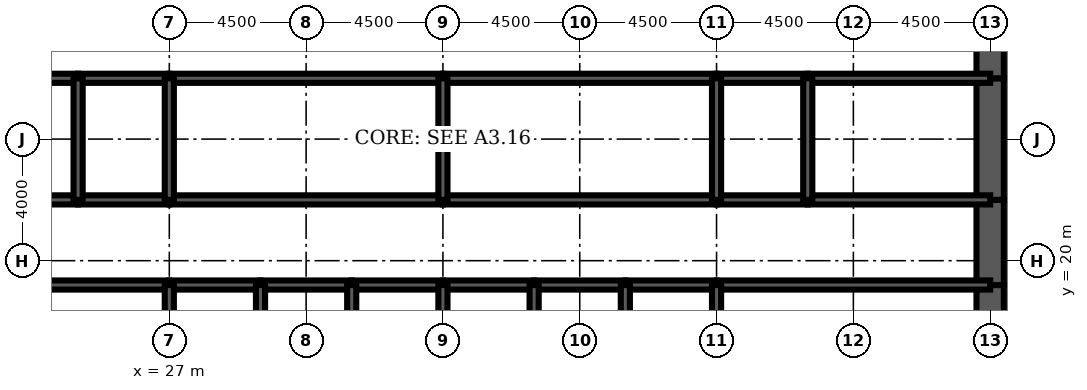
"""IFC4 building model, lengths in metres.
Left out: names, types, materials, properties, quantities, classifications, styles, units other than length and angle.
Written with IfcOpenShell. Run it as: python <this file> out.ifc"""

import sys

from ifc_helpers import new_model, si_unit, direction, frame, frame_2d, origin, place, context, subcontext, project, spatial, rectangle, extrude, element, fill, save


model = new_model("IFC4")
c1 = context("Model", 3, precision=1e-05, world=origin(), true_north=direction((0.0, 1.0)))
c2 = subcontext(c1, "Body", "Model", "MODEL_VIEW")
j1 = project(units=[si_unit("LENGTHUNIT", "METRE"), si_unit("PLANEANGLEUNIT", "RADIAN")], contexts=[c1])
p1 = place(None, origin())
s1 = spatial("IfcSite", under=j1, at=p1, CompositionType="ELEMENT")
p2 = place(p1, origin())
s2 = spatial("IfcBuilding", under=s1, at=p2, CompositionType="ELEMENT")
p3 = place(p2, frame((0.0, 0.0, 68.0)))
s3 = spatial("IfcBuildingStorey", under=s2, at=p3, CompositionType="ELEMENT", Elevation=68.0)
p4 = place(p3, frame((54.0, 16.0, 0.0), z_axis=(0.0, 0.0, 1.0), x_axis=(0.0, 1.0, 0.0)))
e1 = element("IfcWall", 1, at=p4, inside=s3, PredefinedType="SHEAR", context=c2, shape_type="SweptSolid", body=[
    extrude(rectangle(XDim=3.2, YDim=0.9, at=frame_2d((1.6, 0.0))), origin(), (0.0, 0.0, 1.0), 4.5),
])
p5 = place(p3, frame((54.0, 19.2, 0.0), z_axis=(0.0, 0.0, 1.0), x_axis=(0.0, 1.0, 0.0)))
e2 = element("IfcWall", 2, at=p5, inside=s3, PredefinedType="SHEAR", context=c2, shape_type="SweptSolid", body=[
    extrude(rectangle(XDim=2.8, YDim=0.9, at=frame_2d((1.4, 0.0))), origin(), (0.0, 0.0, 1.0), 4.5),
])
p6 = place(p5, frame((0.4, 0.0, 0.0)))
e3 = element("IfcOpeningElement", 3, at=p6, cuts=e2, PredefinedType="OPENING", context=c2, shape_type="SweptSolid", body=[
    extrude(rectangle(XDim=1.8, YDim=2.1, at=frame_2d((0.9, 1.05))), frame((0.0, 0.46, 0.0), z_axis=(0.0, -1.0, 0.0), x_axis=(1.0, 0.0, 0.0)), (0.0, 0.0, 1.0), 0.92),
])
p7 = place(p3, frame((54.0, 22.0, 0.0), z_axis=(0.0, 0.0, 1.0), x_axis=(0.0, 1.0, 0.0)))
e4 = element("IfcWall", 4, at=p7, inside=s3, PredefinedType="SHEAR", context=c2, shape_type="SweptSolid", body=[
    extrude(rectangle(XDim=4.0, YDim=0.9, at=frame_2d((2.0, 0.0))), origin(), (0.0, 0.0, 1.0), 4.5),
])
p8 = place(p3, frame((54.0, 26.0, 0.0), z_axis=(0.0, 0.0, 1.0), x_axis=(0.0, 1.0, 0.0)))
e5 = element("IfcWall", 5, at=p8, inside=s3, PredefinedType="SHEAR", context=c2, shape_type="SweptSolid", body=[
    extrude(rectangle(XDim=2.8, YDim=0.9, at=frame_2d((1.4, 0.0))), origin(), (0.0, 0.0, 1.0), 4.5),
])
p9 = place(p8, frame((0.6, 0.0, 0.0)))
e6 = element("IfcOpeningElement", 6, at=p9, cuts=e5, PredefinedType="OPENING", context=c2, shape_type="SweptSolid", body=[
    extrude(rectangle(XDim=1.8, YDim=2.1, at=frame_2d((0.9, 1.05))), frame((0.0, 0.46, 0.0), z_axis=(0.0, -1.0, 0.0), x_axis=(1.0, 0.0, 0.0)), (0.0, 0.0, 1.0), 0.92),
])
p10 = place(p3, frame((18.0, 19.2, 0.0), z_axis=(0.0, 0.0, 1.0), x_axis=(1.0, 0.0, 0.0)))
e7 = element("IfcWall", 7, at=p10, inside=s3, PredefinedType="SOLIDWALL", context=c2, shape_type="SweptSolid", body=[
    extrude(rectangle(XDim=9.0, YDim=0.3, at=frame_2d((4.5, 0.0))), origin(), (0.0, 0.0, 1.0), 4.5),
])
p11 = place(p10, frame((0.65, 0.0, 0.0)))
e8 = element("IfcOpeningElement", 8, at=p11, cuts=e7, PredefinedType="OPENING", context=c2, shape_type="SweptSolid", body=[
    extrude(rectangle(XDim=1.0, YDim=2.1, at=frame_2d((0.5, 1.05))), frame((0.0, 0.16, 0.0), z_axis=(0.0, -1.0, 0.0), x_axis=(1.0, 0.0, 0.0)), (0.0, 0.0, 1.0), 0.32),
])
p12 = place(p3, frame((27.0, 19.2, 0.0), z_axis=(0.0, 0.0, 1.0), x_axis=(1.0, 0.0, 0.0)))
e9 = element("IfcWall", 9, at=p12, inside=s3, PredefinedType="SOLIDWALL", context=c2, shape_type="SweptSolid", body=[
    extrude(rectangle(XDim=3.0, YDim=0.3, at=frame_2d((1.5, 0.0))), origin(), (0.0, 0.0, 1.0), 4.5),
])
p13 = place(p12, frame((0.95, 0.0, 0.0)))
e10 = element("IfcOpeningElement", 10, at=p13, cuts=e9, PredefinedType="OPENING", context=c2, shape_type="SweptSolid", body=[
    extrude(rectangle(XDim=1.1, YDim=2.2, at=frame_2d((0.55, 1.1))), frame((0.0, 0.16, 0.0), z_axis=(0.0, -1.0, 0.0), x_axis=(1.0, 0.0, 0.0)), (0.0, 0.0, 1.0), 0.32),
])
p14 = place(p3, frame((30.0, 19.2, 0.0), z_axis=(0.0, 0.0, 1.0), x_axis=(1.0, 0.0, 0.0)))
e11 = element("IfcWall", 11, at=p14, inside=s3, PredefinedType="SOLIDWALL", context=c2, shape_type="SweptSolid", body=[
    extrude(rectangle(XDim=3.0, YDim=0.3, at=frame_2d((1.5, 0.0))), origin(), (0.0, 0.0, 1.0), 4.5),
])
p15 = place(p14, frame((0.95, 0.0, 0.0)))
e12 = element("IfcOpeningElement", 12, at=p15, cuts=e11, PredefinedType="OPENING", context=c2, shape_type="SweptSolid", body=[
    extrude(rectangle(XDim=1.1, YDim=2.2, at=frame_2d((0.55, 1.1))), frame((0.0, 0.16, 0.0), z_axis=(0.0, -1.0, 0.0), x_axis=(1.0, 0.0, 0.0)), (0.0, 0.0, 1.0), 0.32),
])
p16 = place(p3, frame((33.0, 19.2, 0.0), z_axis=(0.0, 0.0, 1.0), x_axis=(1.0, 0.0, 0.0)))
e13 = element("IfcWall", 13, at=p16, inside=s3, PredefinedType="SOLIDWALL", context=c2, shape_type="SweptSolid", body=[
    extrude(rectangle(XDim=3.0, YDim=0.3, at=frame_2d((1.5, 0.0))), origin(), (0.0, 0.0, 1.0), 4.5),
])
p17 = place(p16, frame((0.95, 0.0, 0.0)))
e14 = element("IfcOpeningElement", 14, at=p17, cuts=e13, PredefinedType="OPENING", context=c2, shape_type="SweptSolid", body=[
    extrude(rectangle(XDim=1.1, YDim=2.2, at=frame_2d((0.55, 1.1))), frame((0.0, 0.16, 0.0), z_axis=(0.0, -1.0, 0.0), x_axis=(1.0, 0.0, 0.0)), (0.0, 0.0, 1.0), 0.32),
])
p18 = place(p3, frame((36.0, 19.2, 0.0), z_axis=(0.0, 0.0, 1.0), x_axis=(1.0, 0.0, 0.0)))
e15 = element("IfcWall", 15, at=p18, inside=s3, PredefinedType="SOLIDWALL", context=c2, shape_type="SweptSolid", body=[
    extrude(rectangle(XDim=3.0, YDim=0.3, at=frame_2d((1.5, 0.0))), origin(), (0.0, 0.0, 1.0), 4.5),
])
p19 = place(p18, frame((0.95, 0.0, 0.0)))
e16 = element("IfcOpeningElement", 16, at=p19, cuts=e15, PredefinedType="OPENING", context=c2, shape_type="SweptSolid", body=[
    extrude(rectangle(XDim=1.1, YDim=2.2, at=frame_2d((0.55, 1.1))), frame((0.0, 0.16, 0.0), z_axis=(0.0, -1.0, 0.0), x_axis=(1.0, 0.0, 0.0)), (0.0, 0.0, 1.0), 0.32),
])
for number, where, z_axis, x_axis in (
    (17, (39.0, 19.2, 0.0), (0.0, 0.0, 1.0), (1.0, 0.0, 0.0)),
    (18, (42.0, 19.2, 0.0), (0.0, 0.0, 1.0), (1.0, 0.0, 0.0)),
):
    element("IfcWall", number, at=place(p3, frame(where, z_axis=z_axis, x_axis=x_axis)), inside=s3, PredefinedType="SOLIDWALL", context=c2, shape_type="SweptSolid", body=[
        extrude(rectangle(XDim=3.0, YDim=0.3, at=frame_2d((1.5, 0.0))), origin(), (0.0, 0.0, 1.0), 4.5),
    ])
p20 = place(p3, frame((45.0, 19.2, 0.0), z_axis=(0.0, 0.0, 1.0), x_axis=(1.0, 0.0, 0.0)))
e19 = element("IfcWall", 19, at=p20, inside=s3, PredefinedType="SOLIDWALL", context=c2, shape_type="SweptSolid", body=[
    extrude(rectangle(XDim=9.0, YDim=0.3, at=frame_2d((4.5, 0.0))), origin(), (0.0, 0.0, 1.0), 4.5),
])
p21 = place(p20, frame((7.35, 0.0, 0.0)))
e20 = element("IfcOpeningElement", 20, at=p21, cuts=e19, PredefinedType="OPENING", context=c2, shape_type="SweptSolid", body=[
    extrude(rectangle(XDim=1.0, YDim=2.1, at=frame_2d((0.5, 1.05))), frame((0.0, 0.16, 0.0), z_axis=(0.0, -1.0, 0.0), x_axis=(1.0, 0.0, 0.0)), (0.0, 0.0, 1.0), 0.32),
])
p22 = place(p3, frame((18.0, 22.0, 0.0), z_axis=(0.0, 0.0, 1.0), x_axis=(1.0, 0.0, 0.0)))
e21 = element("IfcWall", 21, at=p22, inside=s3, PredefinedType="SOLIDWALL", context=c2, shape_type="SweptSolid", body=[
    extrude(rectangle(XDim=6.0, YDim=0.3, at=frame_2d((3.0, 0.0))), origin(), (0.0, 0.0, 1.0), 4.5),
])
p23 = place(p22, frame((4.4, 0.0, 0.0)))
e22 = element("IfcOpeningElement", 22, at=p23, cuts=e21, PredefinedType="OPENING", context=c2, shape_type="SweptSolid", body=[
    extrude(rectangle(XDim=1.0, YDim=2.1, at=frame_2d((0.5, 1.05))), frame((0.0, 0.16, 0.0), z_axis=(0.0, -1.0, 0.0), x_axis=(1.0, 0.0, 0.0)), (0.0, 0.0, 1.0), 0.32),
])
p24 = place(p22, frame((0.7, 0.0, 0.0)))
e23 = element("IfcOpeningElement", 23, at=p24, cuts=e21, PredefinedType="OPENING", context=c2, shape_type="SweptSolid", body=[
    extrude(rectangle(XDim=1.0, YDim=2.1, at=frame_2d((0.5, 1.05))), frame((0.0, 0.16, 0.0), z_axis=(0.0, -1.0, 0.0), x_axis=(1.0, 0.0, 0.0)), (0.0, 0.0, 1.0), 0.32),
])
p25 = place(p3, frame((24.0, 22.0, 0.0), z_axis=(0.0, 0.0, 1.0), x_axis=(1.0, 0.0, 0.0)))
e24 = element("IfcWall", 24, at=p25, inside=s3, PredefinedType="SOLIDWALL", context=c2, shape_type="SweptSolid", body=[
    extrude(rectangle(XDim=3.0, YDim=0.3, at=frame_2d((1.5, 0.0))), origin(), (0.0, 0.0, 1.0), 4.5),
])
p26 = place(p25, frame((1.0, 0.0, 0.0)))
e25 = element("IfcOpeningElement", 25, at=p26, cuts=e24, PredefinedType="OPENING", context=c2, shape_type="SweptSolid", body=[
    extrude(rectangle(XDim=1.0, YDim=2.1, at=frame_2d((0.5, 1.05))), frame((0.0, 0.16, 0.0), z_axis=(0.0, -1.0, 0.0), x_axis=(1.0, 0.0, 0.0)), (0.0, 0.0, 1.0), 0.32),
])
p27 = place(p3, frame((27.0, 22.0, 0.0), z_axis=(0.0, 0.0, 1.0), x_axis=(1.0, 0.0, 0.0)))
e26 = element("IfcWall", 26, at=p27, inside=s3, PredefinedType="SOLIDWALL", context=c2, shape_type="SweptSolid", body=[
    extrude(rectangle(XDim=9.0, YDim=0.3, at=frame_2d((4.5, 0.0))), origin(), (0.0, 0.0, 1.0), 4.5),
])
p28 = place(p27, frame((4.0, 0.0, 0.0)))
e27 = element("IfcOpeningElement", 27, at=p28, cuts=e26, PredefinedType="OPENING", context=c2, shape_type="SweptSolid", body=[
    extrude(rectangle(XDim=1.0, YDim=2.1, at=frame_2d((0.5, 1.05))), frame((0.0, 0.16, 0.0), z_axis=(0.0, -1.0, 0.0), x_axis=(1.0, 0.0, 0.0)), (0.0, 0.0, 1.0), 0.32),
])
p29 = place(p3, frame((36.0, 22.0, 0.0), z_axis=(0.0, 0.0, 1.0), x_axis=(1.0, 0.0, 0.0)))
e28 = element("IfcWall", 28, at=p29, inside=s3, PredefinedType="SOLIDWALL", context=c2, shape_type="SweptSolid", body=[
    extrude(rectangle(XDim=9.0, YDim=0.3, at=frame_2d((4.5, 0.0))), origin(), (0.0, 0.0, 1.0), 4.5),
])
p30 = place(p29, frame((4.0, 0.0, 0.0)))
e29 = element("IfcOpeningElement", 29, at=p30, cuts=e28, PredefinedType="OPENING", context=c2, shape_type="SweptSolid", body=[
    extrude(rectangle(XDim=1.0, YDim=2.1, at=frame_2d((0.5, 1.05))), frame((0.0, 0.16, 0.0), z_axis=(0.0, -1.0, 0.0), x_axis=(1.0, 0.0, 0.0)), (0.0, 0.0, 1.0), 0.32),
])
p31 = place(p3, frame((45.0, 22.0, 0.0), z_axis=(0.0, 0.0, 1.0), x_axis=(1.0, 0.0, 0.0)))
e30 = element("IfcWall", 30, at=p31, inside=s3, PredefinedType="SOLIDWALL", context=c2, shape_type="SweptSolid", body=[
    extrude(rectangle(XDim=3.0, YDim=0.3, at=frame_2d((1.5, 0.0))), origin(), (0.0, 0.0, 1.0), 4.5),
])
p32 = place(p31, frame((1.0, 0.0, 0.0)))
e31 = element("IfcOpeningElement", 31, at=p32, cuts=e30, PredefinedType="OPENING", context=c2, shape_type="SweptSolid", body=[
    extrude(rectangle(XDim=1.0, YDim=2.1, at=frame_2d((0.5, 1.05))), frame((0.0, 0.16, 0.0), z_axis=(0.0, -1.0, 0.0), x_axis=(1.0, 0.0, 0.0)), (0.0, 0.0, 1.0), 0.32),
])
p33 = place(p3, frame((48.0, 22.0, 0.0), z_axis=(0.0, 0.0, 1.0), x_axis=(1.0, 0.0, 0.0)))
e32 = element("IfcWall", 32, at=p33, inside=s3, PredefinedType="SOLIDWALL", context=c2, shape_type="SweptSolid", body=[
    extrude(rectangle(XDim=6.0, YDim=0.3, at=frame_2d((3.0, 0.0))), origin(), (0.0, 0.0, 1.0), 4.5),
])
p34 = place(p33, frame((2.0, 0.0, 0.0)))
e33 = element("IfcOpeningElement", 33, at=p34, cuts=e32, PredefinedType="OPENING", context=c2, shape_type="SweptSolid", body=[
    extrude(rectangle(XDim=1.0, YDim=2.1, at=frame_2d((0.5, 1.05))), frame((0.0, 0.16, 0.0), z_axis=(0.0, -1.0, 0.0), x_axis=(1.0, 0.0, 0.0)), (0.0, 0.0, 1.0), 0.32),
])
p35 = place(p33, frame((4.0, 0.0, 0.0)))
e34 = element("IfcOpeningElement", 34, at=p35, cuts=e32, PredefinedType="OPENING", context=c2, shape_type="SweptSolid", body=[
    extrude(rectangle(XDim=1.0, YDim=2.1, at=frame_2d((0.5, 1.05))), frame((0.0, 0.16, 0.0), z_axis=(0.0, -1.0, 0.0), x_axis=(1.0, 0.0, 0.0)), (0.0, 0.0, 1.0), 0.32),
])
p36 = place(p3, frame((18.0, 26.0, 0.0), z_axis=(0.0, 0.0, 1.0), x_axis=(1.0, 0.0, 0.0)))
e35 = element("IfcWall", 35, at=p36, inside=s3, PredefinedType="SOLIDWALL", context=c2, shape_type="SweptSolid", body=[
    extrude(rectangle(XDim=6.0, YDim=0.3, at=frame_2d((3.0, 0.0))), origin(), (0.0, 0.0, 1.0), 4.5),
])
p37 = place(p3, frame((24.0, 26.0, 0.0), z_axis=(0.0, 0.0, 1.0), x_axis=(1.0, 0.0, 0.0)))
e36 = element("IfcWall", 36, at=p37, inside=s3, PredefinedType="SOLIDWALL", context=c2, shape_type="SweptSolid", body=[
    extrude(rectangle(XDim=3.0, YDim=0.3, at=frame_2d((1.5, 0.0))), origin(), (0.0, 0.0, 1.0), 4.5),
])
for number, where, z_axis, x_axis in (
    (37, (27.0, 26.0, 0.0), (0.0, 0.0, 1.0), (1.0, 0.0, 0.0)),
    (38, (36.0, 26.0, 0.0), (0.0, 0.0, 1.0), (1.0, 0.0, 0.0)),
):
    element("IfcWall", number, at=place(p3, frame(where, z_axis=z_axis, x_axis=x_axis)), inside=s3, PredefinedType="SOLIDWALL", context=c2, shape_type="SweptSolid", body=[
        extrude(rectangle(XDim=9.0, YDim=0.3, at=frame_2d((4.5, 0.0))), origin(), (0.0, 0.0, 1.0), 4.5),
    ])
p38 = place(p3, frame((45.0, 26.0, 0.0), z_axis=(0.0, 0.0, 1.0), x_axis=(1.0, 0.0, 0.0)))
e39 = element("IfcWall", 39, at=p38, inside=s3, PredefinedType="SOLIDWALL", context=c2, shape_type="SweptSolid", body=[
    extrude(rectangle(XDim=3.0, YDim=0.3, at=frame_2d((1.5, 0.0))), origin(), (0.0, 0.0, 1.0), 4.5),
])
p39 = place(p3, frame((48.0, 26.0, 0.0), z_axis=(0.0, 0.0, 1.0), x_axis=(1.0, 0.0, 0.0)))
e40 = element("IfcWall", 40, at=p39, inside=s3, PredefinedType="SOLIDWALL", context=c2, shape_type="SweptSolid", body=[
    extrude(rectangle(XDim=6.0, YDim=0.3, at=frame_2d((3.0, 0.0))), origin(), (0.0, 0.0, 1.0), 4.5),
])
for number, where, z_axis, x_axis in (
    (41, (27.0, 16.0, 0.0), (0.0, 0.0, 1.0), (0.0, 1.0, 0.0)),
    (42, (30.0, 16.0, 0.0), (0.0, 0.0, 1.0), (0.0, 1.0, 0.0)),
    (43, (33.0, 16.0, 0.0), (0.0, 0.0, 1.0), (0.0, 1.0, 0.0)),
    (44, (36.0, 16.0, 0.0), (0.0, 0.0, 1.0), (0.0, 1.0, 0.0)),
    (45, (39.0, 16.0, 0.0), (0.0, 0.0, 1.0), (0.0, 1.0, 0.0)),
    (46, (42.0, 16.0, 0.0), (0.0, 0.0, 1.0), (0.0, 1.0, 0.0)),
    (47, (45.0, 16.0, 0.0), (0.0, 0.0, 1.0), (0.0, 1.0, 0.0)),
):
    element("IfcWall", number, at=place(p3, frame(where, z_axis=z_axis, x_axis=x_axis)), inside=s3, PredefinedType="SOLIDWALL", context=c2, shape_type="SweptSolid", body=[
        extrude(rectangle(XDim=3.2, YDim=0.3, at=frame_2d((1.6, 0.0))), origin(), (0.0, 0.0, 1.0), 4.5),
    ])
for number, where, z_axis, x_axis in (
    (48, (24.0, 22.0, 0.0), (0.0, 0.0, 1.0), (0.0, 1.0, 0.0)),
    (49, (27.0, 22.0, 0.0), (0.0, 0.0, 1.0), (0.0, 1.0, 0.0)),
    (50, (36.0, 22.0, 0.0), (0.0, 0.0, 1.0), (0.0, 1.0, 0.0)),
    (51, (45.0, 22.0, 0.0), (0.0, 0.0, 1.0), (0.0, 1.0, 0.0)),
    (52, (48.0, 22.0, 0.0), (0.0, 0.0, 1.0), (0.0, 1.0, 0.0)),
):
    element("IfcWall", number, at=place(p3, frame(where, z_axis=z_axis, x_axis=x_axis)), inside=s3, PredefinedType="SOLIDWALL", context=c2, shape_type="SweptSolid", body=[
        extrude(rectangle(XDim=4.0, YDim=0.3, at=frame_2d((2.0, 0.0))), origin(), (0.0, 0.0, 1.0), 4.5),
    ])
p40 = place(p3, frame((42.0, 22.15, 0.0), z_axis=(0.0, 0.0, 1.0), x_axis=(0.0, 1.0, 0.0)))
e53 = element("IfcWall", 53, at=p40, inside=s3, PredefinedType="PARTITIONING", context=c2, shape_type="SweptSolid", body=[
    extrude(rectangle(XDim=3.7, YDim=0.15, at=frame_2d((1.85, 0.0))), origin(), (0.0, 0.0, 1.0), 3.0),
])
p41 = place(p40, frame((2.2, 0.0, 0.0)))
e54 = element("IfcOpeningElement", 54, at=p41, cuts=e53, PredefinedType="OPENING", context=c2, shape_type="SweptSolid", body=[
    extrude(rectangle(XDim=1.0, YDim=2.1, at=frame_2d((0.5, 1.05))), frame((0.0, 0.085, 0.0), z_axis=(0.0, -1.0, 0.0), x_axis=(1.0, 0.0, 0.0)), (0.0, 0.0, 1.0), 0.17),
])
p42 = place(p3, frame((51.375, 22.15, 0.0), z_axis=(0.0, 0.0, 1.0), x_axis=(0.0, 1.0, 0.0)))
e55 = element("IfcWall", 55, at=p42, inside=s3, PredefinedType="PARTITIONING", context=c2, shape_type="SweptSolid", body=[
    extrude(rectangle(XDim=3.7, YDim=0.15, at=frame_2d((1.85, 0.0))), origin(), (0.0, 0.0, 1.0), 3.0),
])
p43 = place(p3, frame((47.7, 19.35, 0.0), z_axis=(0.0, 0.0, 1.0), x_axis=(0.0, 1.0, 0.0)))
e56 = element("IfcWall", 56, at=p43, inside=s3, PredefinedType="PARTITIONING", context=c2, shape_type="SweptSolid", body=[
    extrude(rectangle(XDim=2.5, YDim=0.15, at=frame_2d((1.25, 0.0))), origin(), (0.0, 0.0, 1.0), 3.0),
])
p44 = place(p43, frame((1.15, 0.0, 0.0)))
e57 = element("IfcOpeningElement", 57, at=p44, cuts=e56, PredefinedType="OPENING", context=c2, shape_type="SweptSolid", body=[
    extrude(rectangle(XDim=1.0, YDim=2.1, at=frame_2d((0.5, 1.05))), frame((0.0, 0.085, 0.0), z_axis=(0.0, -1.0, 0.0), x_axis=(1.0, 0.0, 0.0)), (0.0, 0.0, 1.0), 0.17),
])
p45 = place(p41, origin())
e58 = element("IfcDoor", 58, at=p45, inside=s3, OperationType="SINGLE_SWING_RIGHT", PredefinedType="DOOR", context=c2, shape_type="SweptSolid", body=[
    extrude(rectangle(XDim=1.0, YDim=2.1, at=frame_2d((0.5, 1.05))), frame((0.0, 0.025, 0.0), z_axis=(0.0, -1.0, 0.0), x_axis=(1.0, 0.0, 0.0)), (0.0, 0.0, 1.0), 0.05),
])
fill(e54, e58)
p46 = place(p44, origin())
e59 = element("IfcDoor", 59, at=p46, inside=s3, OperationType="SINGLE_SWING_RIGHT", PredefinedType="DOOR", context=c2, shape_type="SweptSolid", body=[
    extrude(rectangle(XDim=1.0, YDim=2.1, at=frame_2d((0.5, 1.05))), frame((0.0, 0.025, 0.0), z_axis=(0.0, -1.0, 0.0), x_axis=(1.0, 0.0, 0.0)), (0.0, 0.0, 1.0), 0.05),
])
fill(e57, e59)
p47 = place(p13, origin())
e60 = element("IfcDoor", 60, at=p47, inside=s3, OperationType="DOUBLE_DOOR_SLIDING", PredefinedType="USERDEFINED", context=c2, shape_type="SweptSolid", body=[
    extrude(rectangle(XDim=1.1, YDim=2.2, at=frame_2d((0.55, 1.1))), frame((0.0, 0.025, 0.0), z_axis=(0.0, -1.0, 0.0), x_axis=(1.0, 0.0, 0.0)), (0.0, 0.0, 1.0), 0.05),
])
fill(e10, e60)
p48 = place(p15, origin())
e61 = element("IfcDoor", 61, at=p48, inside=s3, OperationType="DOUBLE_DOOR_SLIDING", PredefinedType="USERDEFINED", context=c2, shape_type="SweptSolid", body=[
    extrude(rectangle(XDim=1.1, YDim=2.2, at=frame_2d((0.55, 1.1))), frame((0.0, 0.025, 0.0), z_axis=(0.0, -1.0, 0.0), x_axis=(1.0, 0.0, 0.0)), (0.0, 0.0, 1.0), 0.05),
])
fill(e12, e61)
p49 = place(p17, origin())
e62 = element("IfcDoor", 62, at=p49, inside=s3, OperationType="DOUBLE_DOOR_SLIDING", PredefinedType="USERDEFINED", context=c2, shape_type="SweptSolid", body=[
    extrude(rectangle(XDim=1.1, YDim=2.2, at=frame_2d((0.55, 1.1))), frame((0.0, 0.025, 0.0), z_axis=(0.0, -1.0, 0.0), x_axis=(1.0, 0.0, 0.0)), (0.0, 0.0, 1.0), 0.05),
])
fill(e14, e62)
p50 = place(p19, origin())
e63 = element("IfcDoor", 63, at=p50, inside=s3, OperationType="DOUBLE_DOOR_SLIDING", PredefinedType="USERDEFINED", context=c2, shape_type="SweptSolid", body=[
    extrude(rectangle(XDim=1.1, YDim=2.2, at=frame_2d((0.55, 1.1))), frame((0.0, 0.025, 0.0), z_axis=(0.0, -1.0, 0.0), x_axis=(1.0, 0.0, 0.0)), (0.0, 0.0, 1.0), 0.05),
])
fill(e16, e63)
p51 = place(p21, origin())
e64 = element("IfcDoor", 64, at=p51, inside=s3, OperationType="SINGLE_SWING_RIGHT", PredefinedType="DOOR", context=c2, shape_type="SweptSolid", body=[
    extrude(rectangle(XDim=1.0, YDim=2.1, at=frame_2d((0.5, 1.05))), frame((0.0, 0.025, 0.0), z_axis=(0.0, -1.0, 0.0), x_axis=(1.0, 0.0, 0.0)), (0.0, 0.0, 1.0), 0.05),
])
fill(e20, e64)
p52 = place(p6, origin())
e65 = element("IfcDoor", 65, at=p52, inside=s3, OperationType="SINGLE_SWING_LEFT", PredefinedType="DOOR", context=c2, shape_type="SweptSolid", body=[
    extrude(rectangle(XDim=1.8, YDim=2.1, at=frame_2d((0.9, 1.05))), frame((0.0, 0.45, 0.0), z_axis=(0.0, -1.0, 0.0), x_axis=(1.0, 0.0, 0.0)), (0.0, 0.0, 1.0), 0.899),
])
fill(e3, e65)
p53 = place(p9, origin())
e66 = element("IfcDoor", 66, at=p53, inside=s3, OperationType="SINGLE_SWING_LEFT", PredefinedType="DOOR", context=c2, shape_type="SweptSolid", body=[
    extrude(rectangle(XDim=1.8, YDim=2.1, at=frame_2d((0.9, 1.05))), frame((0.0, 0.45, 0.0), z_axis=(0.0, -1.0, 0.0), x_axis=(1.0, 0.0, 0.0)), (0.0, 0.0, 1.0), 0.899),
])
fill(e6, e66)
p54 = place(p23, origin())
e67 = element("IfcDoor", 67, at=p54, inside=s3, OperationType="SINGLE_SWING_RIGHT", PredefinedType="DOOR", context=c2, shape_type="SweptSolid", body=[
    extrude(rectangle(XDim=1.0, YDim=2.1, at=frame_2d((0.5, 1.05))), frame((0.0, 0.025, 0.0), z_axis=(0.0, -1.0, 0.0), x_axis=(1.0, 0.0, 0.0)), (0.0, 0.0, 1.0), 0.05),
])
fill(e22, e67)
p55 = place(p26, origin())
e68 = element("IfcDoor", 68, at=p55, inside=s3, OperationType="SINGLE_SWING_LEFT", PredefinedType="DOOR", context=c2, shape_type="SweptSolid", body=[
    extrude(rectangle(XDim=1.0, YDim=2.1, at=frame_2d((0.5, 1.05))), frame((0.0, 0.025, 0.0), z_axis=(0.0, -1.0, 0.0), x_axis=(1.0, 0.0, 0.0)), (0.0, 0.0, 1.0), 0.05),
])
fill(e25, e68)
p56 = place(p28, origin())
e69 = element("IfcDoor", 69, at=p56, inside=s3, OperationType="SINGLE_SWING_LEFT", PredefinedType="DOOR", context=c2, shape_type="SweptSolid", body=[
    extrude(rectangle(XDim=1.0, YDim=2.1, at=frame_2d((0.5, 1.05))), frame((0.0, 0.025, 0.0), z_axis=(0.0, -1.0, 0.0), x_axis=(1.0, 0.0, 0.0)), (0.0, 0.0, 1.0), 0.05),
])
fill(e27, e69)
p57 = place(p30, origin())
e70 = element("IfcDoor", 70, at=p57, inside=s3, OperationType="SINGLE_SWING_LEFT", PredefinedType="DOOR", context=c2, shape_type="SweptSolid", body=[
    extrude(rectangle(XDim=1.0, YDim=2.1, at=frame_2d((0.5, 1.05))), frame((0.0, 0.025, 0.0), z_axis=(0.0, -1.0, 0.0), x_axis=(1.0, 0.0, 0.0)), (0.0, 0.0, 1.0), 0.05),
])
fill(e29, e70)
p58 = place(p32, origin())
e71 = element("IfcDoor", 71, at=p58, inside=s3, OperationType="SINGLE_SWING_LEFT", PredefinedType="DOOR", context=c2, shape_type="SweptSolid", body=[
    extrude(rectangle(XDim=1.0, YDim=2.1, at=frame_2d((0.5, 1.05))), frame((0.0, 0.025, 0.0), z_axis=(0.0, -1.0, 0.0), x_axis=(1.0, 0.0, 0.0)), (0.0, 0.0, 1.0), 0.05),
])
fill(e31, e71)
p59 = place(p34, origin())
e72 = element("IfcDoor", 72, at=p59, inside=s3, OperationType="SINGLE_SWING_LEFT", PredefinedType="DOOR", context=c2, shape_type="SweptSolid", body=[
    extrude(rectangle(XDim=1.0, YDim=2.1, at=frame_2d((0.5, 1.05))), frame((0.0, 0.025, 0.0), z_axis=(0.0, -1.0, 0.0), x_axis=(1.0, 0.0, 0.0)), (0.0, 0.0, 1.0), 0.05),
])
fill(e33, e72)
p60 = place(p35, origin())
e73 = element("IfcDoor", 73, at=p60, inside=s3, OperationType="SINGLE_SWING_RIGHT", PredefinedType="DOOR", context=c2, shape_type="SweptSolid", body=[
    extrude(rectangle(XDim=1.0, YDim=2.1, at=frame_2d((0.5, 1.05))), frame((0.0, 0.025, 0.0), z_axis=(0.0, -1.0, 0.0), x_axis=(1.0, 0.0, 0.0)), (0.0, 0.0, 1.0), 0.05),
])
fill(e34, e73)
save(model, sys.argv[1])
